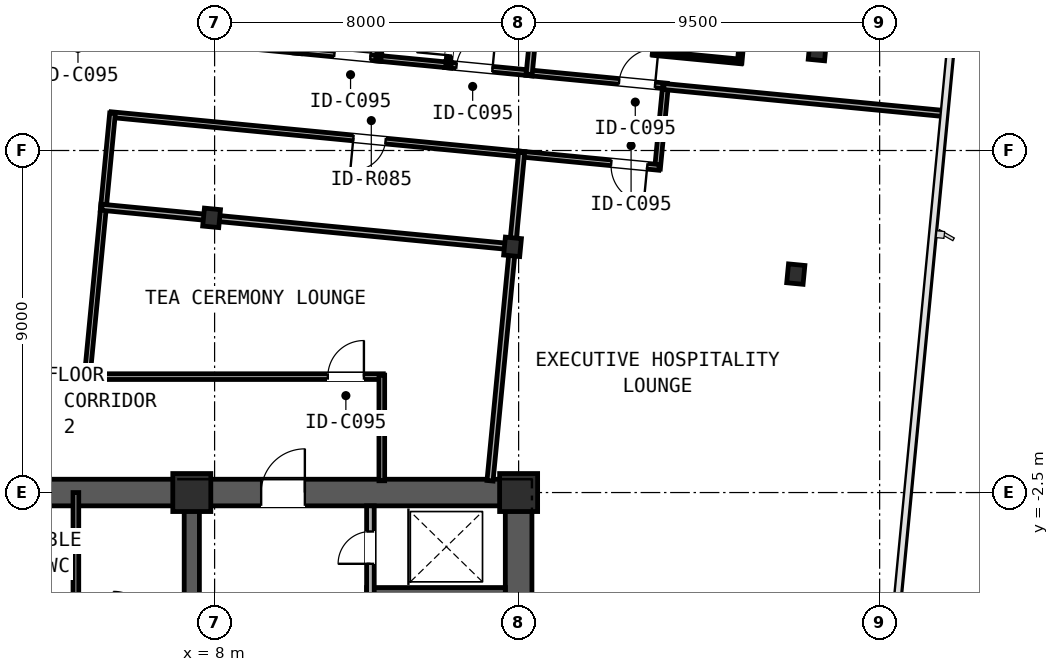
"""IFC4 building model, lengths in metres.
Left out: names, types, materials, properties, quantities, classifications, styles, units other than length and angle.
Written with IfcOpenShell. Run it as: python <this file> out.ifc"""

import sys

from ifc_helpers import new_model, si_unit, direction, frame, frame_2d, origin, origin_2d, place, context, subcontext, project, spatial, rectangle, i_section, extrude, element, fill, save


model = new_model("IFC4")
c1 = context("Model", 3, precision=1e-05, world=origin(), true_north=direction((0.0, 1.0)))
c2 = subcontext(c1, "Body", "Model", "MODEL_VIEW")
j1 = project(units=[si_unit("LENGTHUNIT", "METRE"), si_unit("PLANEANGLEUNIT", "RADIAN")], contexts=[c1])
p1 = place(None, origin())
s1 = spatial("IfcSite", under=j1, at=p1, CompositionType="ELEMENT")
p2 = place(p1, origin())
s2 = spatial("IfcBuilding", under=s1, at=p2, CompositionType="ELEMENT")
p3 = place(p2, frame((0.0, 0.0, 142.8)))
s3 = spatial("IfcBuildingStorey", under=s2, at=p3, CompositionType="ELEMENT", Elevation=142.8)
p4 = place(p3, frame((-16.35, -2.5, 0.0), z_axis=(0.0, 0.0, 1.0), x_axis=(1.0, 0.0, 0.0)))
e1 = element("IfcWall", 1, at=p4, inside=s3, PredefinedType="SHEAR", context=c2, shape_type="SweptSolid", body=[
    extrude(rectangle(XDim=32.7, YDim=0.7, at=frame_2d((16.35, 0.0))), origin(), (0.0, 0.0, 1.0), 2.91),
])
p5 = place(p4, frame((5.975, 0.0, 0.0)))
e2 = element("IfcOpeningElement", 2, at=p5, cuts=e1, PredefinedType="OPENING", context=c2, shape_type="SweptSolid", body=[
    extrude(rectangle(XDim=1.15, YDim=2.0, at=frame_2d((0.575, 1.0))), frame((0.0, 0.36, 0.0), z_axis=(0.0, -1.0, 0.0), x_axis=(1.0, 0.0, 0.0)), (0.0, 0.0, 1.0), 0.72),
])
p6 = place(p4, frame((15.55, 0.0, 0.0)))
e3 = element("IfcOpeningElement", 3, at=p6, cuts=e1, PredefinedType="OPENING", context=c2, shape_type="SweptSolid", body=[
    extrude(rectangle(XDim=1.6, YDim=2.0, at=frame_2d((0.8, 1.0))), frame((0.0, 0.36, 0.0), z_axis=(0.0, -1.0, 0.0), x_axis=(1.0, 0.0, 0.0)), (0.0, 0.0, 1.0), 0.72),
])
p7 = place(p4, frame((25.575, 0.0, 0.0)))
e4 = element("IfcOpeningElement", 4, at=p7, cuts=e1, PredefinedType="OPENING", context=c2, shape_type="SweptSolid", body=[
    extrude(rectangle(XDim=1.15, YDim=2.0, at=frame_2d((0.575, 1.0))), frame((0.0, 0.36, 0.0), z_axis=(0.0, -1.0, 0.0), x_axis=(1.0, 0.0, 0.0)), (0.0, 0.0, 1.0), 0.72),
])
p8 = place(p3, frame((16.0, -12.65, 0.0), z_axis=(0.0, 0.0, 1.0), x_axis=(0.0, 1.0, 0.0)))
e5 = element("IfcWall", 5, at=p8, inside=s3, PredefinedType="SHEAR", context=c2, shape_type="SweptSolid", body=[
    extrude(rectangle(XDim=9.8, YDim=0.7, at=frame_2d((4.9, 0.0))), origin(), (0.0, 0.0, 1.0), 2.91),
])
p9 = place(p3, frame((7.4, -12.65, 0.0), z_axis=(0.0, 0.0, 1.0), x_axis=(0.0, 1.0, 0.0)))
e6 = element("IfcWall", 6, at=p9, inside=s3, PredefinedType="SHEAR", context=c2, shape_type="SweptSolid", body=[
    extrude(rectangle(XDim=9.8, YDim=0.4, at=frame_2d((4.9, 0.0))), origin(), (0.0, 0.0, 1.0), 3.19),
])
p10 = place(p3, frame((12.0, -5.1, 0.0), z_axis=(0.0, 0.0, 1.0), x_axis=(1.0, 0.0, 0.0)))
e7 = element("IfcWall", 7, at=p10, inside=s3, PredefinedType="SOLIDWALL", context=c2, shape_type="SweptSolid", body=[
    extrude(rectangle(XDim=3.65, YDim=0.2, at=frame_2d((1.825, 0.0))), origin(), (0.0, 0.0, 1.0), 3.19),
])
for number, where, z_axis, x_axis in (
    (8, (7.4, -2.5, 0.0), (0.0, 0.0, 1.0), (1.0, 0.0, 0.0)),
    (9, (16.0, -2.5, 0.0), (0.0, 0.0, 1.0), (1.0, 0.0, 0.0)),
):
    element("IfcColumn", number, at=place(p3, frame(where, z_axis=z_axis, x_axis=x_axis)), inside=s3, PredefinedType="COLUMN", context=c2, shape_type="SweptSolid", body=[
        extrude(rectangle(XDim=1.0, YDim=1.0, at=origin_2d()), origin(), (0.0, 0.0, 1.0), 3.45),
    ])
for number, where, z_axis, x_axis in (
    (10, (7.921, 4.728, 0.0), (0.0, 0.0, 1.0), (0.995, -0.096, 0.0)),
    (11, (15.84, 3.965, 0.0), (0.0, 0.0, 1.0), (0.995, -0.096, 0.0)),
):
    element("IfcColumn", number, at=place(p3, frame(where, z_axis=z_axis, x_axis=x_axis)), inside=s3, PredefinedType="COLUMN", context=c2, shape_type="SweptSolid", body=[
        extrude(i_section(OverallWidth=0.424, OverallDepth=0.474, WebThickness=0.048, FlangeThickness=0.077, FilletRadius=0.031, at=origin_2d()), origin(), (0.0, 0.0, 1.0), 3.45),
    ])
for number, where, z_axis, x_axis in (
    (12, (23.293, 3.248, 0.0), (0.0, 0.0, 1.0), (0.995, -0.096, 0.0)),
    (13, (23.86, 9.128, 0.0), (0.0, 0.0, 1.0), (0.995, -0.096, 0.0)),
):
    element("IfcColumn", number, at=place(p3, frame(where, z_axis=z_axis, x_axis=x_axis)), inside=s3, PredefinedType="COLUMN", context=c2, shape_type="SweptSolid", body=[
        extrude(i_section(OverallWidth=0.432, OverallDepth=0.498, WebThickness=0.056, FlangeThickness=0.089, FilletRadius=0.031, at=origin_2d()), origin(), (0.0, 0.0, 1.0), 3.45),
    ])
p11 = place(p3, frame((12.1, -5.2, 0.0), z_axis=(0.0, 0.0, 1.0), x_axis=(0.0, 1.0, 0.0)))
e14 = element("IfcWall", 14, at=p11, inside=s3, PredefinedType="PARTITIONING", context=c2, shape_type="SweptSolid", body=[
    extrude(rectangle(XDim=2.35, YDim=0.2, at=frame_2d((1.175, 0.0))), origin(), (0.0, 0.0, 1.0), 2.225),
])
p12 = place(p11, frame((0.825, 0.0, 0.0)))
e15 = element("IfcOpeningElement", 15, at=p12, cuts=e14, PredefinedType="OPENING", context=c2, shape_type="SweptSolid", body=[
    extrude(rectangle(XDim=0.85, YDim=2.05, at=frame_2d((0.425, 1.025))), frame((0.0, 0.11, 0.0), z_axis=(0.0, -1.0, 0.0), x_axis=(1.0, 0.0, 0.0)), (0.0, 0.0, 1.0), 0.22),
])
p13 = place(p3, frame((4.35, -6.0, 0.0), z_axis=(0.0, 0.0, 1.0), x_axis=(0.0, 1.0, 0.0)))
e16 = element("IfcWall", 16, at=p13, inside=s3, PredefinedType="PARTITIONING", context=c2, shape_type="SweptSolid", body=[
    extrude(rectangle(XDim=3.5, YDim=0.15, at=frame_2d((1.75, 0.0))), origin(), (0.0, 0.0, 1.0), 2.225),
])
p14 = place(p3, frame((10.101, 9.139, 0.0), z_axis=(0.0, 0.0, 1.0), x_axis=(0.995393345625, -0.095875374756, 0.0)))
e17 = element("IfcWall", 17, at=p14, inside=s3, PredefinedType="PARTITIONING", context=c2, shape_type="SweptSolid", body=[
    extrude(rectangle(XDim=2.312, YDim=0.15, at=frame_2d((1.156, 0.0))), origin(), (0.0, 0.0, 1.0), 2.718),
])
p15 = place(p14, frame((1.056, 0.0, 0.0)))
e18 = element("IfcOpeningElement", 18, at=p15, cuts=e17, PredefinedType="OPENING", context=c2, shape_type="SweptSolid", body=[
    extrude(rectangle(XDim=0.95, YDim=2.15, at=frame_2d((0.475, 1.075))), frame((0.0, 0.085, 0.0), z_axis=(0.0, -1.0, 0.0), x_axis=(1.0, 0.0, 0.0)), (0.0, 0.0, 1.0), 0.17),
])
p16 = place(p3, frame((8.28, 9.314, 0.0), z_axis=(0.0, 0.0, 1.0), x_axis=(0.995393086543, -0.095878064554, 0.0)))
e19 = element("IfcWall", 19, at=p16, inside=s3, PredefinedType="PARTITIONING", context=c2, shape_type="SweptSolid", body=[
    extrude(rectangle(XDim=1.994, YDim=0.15, at=frame_2d((0.997, 0.0))), origin(), (0.0, 0.0, 1.0), 2.479),
])
p17 = place(p3, frame((14.061, 8.758, 0.0), z_axis=(0.0, 0.0, 1.0), x_axis=(0.995393345625, -0.095875374756, 0.0)))
e20 = element("IfcWall", 20, at=p17, inside=s3, PredefinedType="PARTITIONING", context=c2, shape_type="SweptSolid", body=[
    extrude(rectangle(XDim=2.312, YDim=0.15, at=frame_2d((1.156, 0.0))), origin(), (0.0, 0.0, 1.0), 2.479),
])
p18 = place(p17, frame((0.306, 0.0, 0.0)))
e21 = element("IfcOpeningElement", 21, at=p18, cuts=e20, PredefinedType="OPENING", context=c2, shape_type="SweptSolid", body=[
    extrude(rectangle(XDim=0.95, YDim=2.15, at=frame_2d((0.475, 1.075))), frame((0.0, 0.085, 0.0), z_axis=(0.0, -1.0, 0.0), x_axis=(1.0, 0.0, 0.0)), (0.0, 0.0, 1.0), 0.17),
])
p19 = place(p3, frame((12.24, 8.933, 0.0), z_axis=(0.0, 0.0, 1.0), x_axis=(0.995405888026, -0.095745068196, 0.0)))
e22 = element("IfcWall", 22, at=p19, inside=s3, PredefinedType="PARTITIONING", context=c2, shape_type="SweptSolid", body=[
    extrude(rectangle(XDim=1.994, YDim=0.15, at=frame_2d((0.997, 0.0))), origin(), (0.0, 0.0, 1.0), 2.718),
])
p20 = place(p3, frame((16.199, 8.552, 0.0), z_axis=(0.0, 0.0, 1.0), x_axis=(0.995391104887, -0.095898635608, 0.0)))
e23 = element("IfcWall", 23, at=p20, inside=s3, PredefinedType="PARTITIONING", context=c2, shape_type="SweptSolid", body=[
    extrude(rectangle(XDim=3.722, YDim=0.15, at=frame_2d((1.861, 0.0))), origin(), (0.0, 0.0, 1.0), 2.479),
])
p21 = place(p20, frame((2.457, 0.0, 0.0)))
e24 = element("IfcOpeningElement", 24, at=p21, cuts=e23, PredefinedType="OPENING", context=c2, shape_type="SweptSolid", body=[
    extrude(rectangle(XDim=0.95, YDim=2.15, at=frame_2d((0.475, 1.075))), frame((0.0, 0.085, 0.0), z_axis=(0.0, -1.0, 0.0), x_axis=(1.0, 0.0, 0.0)), (0.0, 0.0, 1.0), 0.17),
])
p22 = place(p3, frame((16.156, 6.396, 0.0), z_axis=(0.0, 0.0, 1.0), x_axis=(-0.99539478422, 0.095860437863, 0.0)))
e25 = element("IfcWall", 25, at=p22, inside=s3, PredefinedType="PARTITIONING", context=c2, shape_type="SweptSolid", body=[
    extrude(rectangle(XDim=10.936, YDim=0.15, at=frame_2d((5.468, 0.0))), origin(), (0.0, 0.0, 1.0), 2.479),
])
p23 = place(p22, frame((3.675, 0.0, 0.0)))
e26 = element("IfcOpeningElement", 26, at=p23, cuts=e25, PredefinedType="OPENING", context=c2, shape_type="SweptSolid", body=[
    extrude(rectangle(XDim=0.85, YDim=2.05, at=frame_2d((0.425, 1.025))), frame((0.0, 0.085, 0.0), z_axis=(0.0, -1.0, 0.0), x_axis=(1.0, 0.0, 0.0)), (0.0, 0.0, 1.0), 0.17),
])
p24 = place(p3, frame((5.314, 7.48, 0.0), z_axis=(0.0, 0.0, 1.0), x_axis=(-0.09587519517, -0.995393362923, 0.0)))
e27 = element("IfcWall", 27, at=p24, inside=s3, PredefinedType="PARTITIONING", context=c2, shape_type="SweptSolid", body=[
    extrude(rectangle(XDim=2.572, YDim=0.15, at=frame_2d((1.286, 0.0))), origin(), (0.0, 0.0, 1.0), 2.479),
])
p25 = place(p3, frame((5.084, 5.083, 0.0), z_axis=(0.0, 0.0, 1.0), x_axis=(-0.095867331855, -0.995394120277, 0.0)))
e28 = element("IfcWall", 28, at=p25, inside=s3, PredefinedType="PARTITIONING", context=c2, shape_type="SweptSolid", body=[
    extrude(rectangle(XDim=4.594, YDim=0.15, at=frame_2d((2.297, 0.0))), origin(), (0.0, 0.0, 1.0), 2.479),
])
p26 = place(p3, frame((4.607, 0.55, 0.0), z_axis=(0.0, 0.0, 1.0), x_axis=(1.0, 0.0, 0.0)))
e29 = element("IfcWall", 29, at=p26, inside=s3, PredefinedType="PARTITIONING", context=c2, shape_type="SweptSolid", body=[
    extrude(rectangle(XDim=7.833, YDim=0.15, at=frame_2d((3.917, 0.0))), origin(), (0.0, 0.0, 1.0), 2.479),
])
p27 = place(p26, frame((6.372, 0.0, 0.0)))
e30 = element("IfcOpeningElement", 30, at=p27, cuts=e29, PredefinedType="OPENING", context=c2, shape_type="SweptSolid", body=[
    extrude(rectangle(XDim=0.95, YDim=2.15, at=frame_2d((0.475, 1.075))), frame((0.0, 0.085, 0.0), z_axis=(0.0, -1.0, 0.0), x_axis=(1.0, 0.0, 0.0)), (0.0, 0.0, 1.0), 0.17),
])
p28 = place(p3, frame((12.4, 0.59, 0.0), z_axis=(0.0, 0.0, 1.0), x_axis=(0.0, -1.0, 0.0)))
e31 = element("IfcWall", 31, at=p28, inside=s3, PredefinedType="PARTITIONING", context=c2, shape_type="SweptSolid", body=[
    extrude(rectangle(XDim=2.78, YDim=0.15, at=frame_2d((1.39, 0.0))), origin(), (0.0, 0.0, 1.0), 2.225),
])
p29 = place(p3, frame((19.866, 8.219, 0.0), z_axis=(0.0, 0.0, 1.0), x_axis=(-0.095773447772, -0.995403157872, 0.0)))
e32 = element("IfcWall", 32, at=p29, inside=s3, PredefinedType="PARTITIONING", context=c2, shape_type="SweptSolid", body=[
    extrude(rectangle(XDim=2.21, YDim=0.15, at=frame_2d((1.105, 0.0))), origin(), (0.0, 0.0, 1.0), 2.718),
])
p30 = place(p3, frame((19.698, 6.055, 0.0), z_axis=(0.0, 0.0, 1.0), x_axis=(-0.995397364202, 0.095833644092, 0.0)))
e33 = element("IfcWall", 33, at=p30, inside=s3, PredefinedType="PARTITIONING", context=c2, shape_type="SweptSolid", body=[
    extrude(rectangle(XDim=3.722, YDim=0.15, at=frame_2d((1.861, 0.0))), origin(), (0.0, 0.0, 1.0), 2.479),
])
p31 = place(p30, frame((0.315, 0.0, 0.0)))
e34 = element("IfcOpeningElement", 34, at=p31, cuts=e33, PredefinedType="OPENING", context=c2, shape_type="SweptSolid", body=[
    extrude(rectangle(XDim=0.95, YDim=2.15, at=frame_2d((0.475, 1.075))), frame((0.0, 0.085, 0.0), z_axis=(0.0, -1.0, 0.0), x_axis=(1.0, 0.0, 0.0)), (0.0, 0.0, 1.0), 0.17),
])
p32 = place(p3, frame((10.179, 9.091, 0.0), z_axis=(0.0, 0.0, 1.0), x_axis=(0.095799078022, 0.995400691506, 0.0)))
e35 = element("IfcWall", 35, at=p32, inside=s3, PredefinedType="PARTITIONING", context=c2, shape_type="SweptSolid", body=[
    extrude(rectangle(XDim=2.63, YDim=0.12, at=frame_2d((1.315, 0.0))), origin(), (0.0, 0.0, 1.0), 2.479),
])
p33 = place(p32, frame((0.247, 0.0, 0.0)))
e36 = element("IfcOpeningElement", 36, at=p33, cuts=e35, PredefinedType="OPENING", context=c2, shape_type="SweptSolid", body=[
    extrude(rectangle(XDim=0.85, YDim=2.1, at=frame_2d((0.425, 1.05))), frame((0.0, 0.07, 0.0), z_axis=(0.0, -1.0, 0.0), x_axis=(1.0, 0.0, 0.0)), (0.0, 0.0, 1.0), 0.14),
])
p34 = place(p3, frame((12.526, 11.048, 0.0), z_axis=(0.0, 0.0, 1.0), x_axis=(-0.095875173929, -0.995393364969, 0.0)))
e37 = element("IfcWall", 37, at=p34, inside=s3, PredefinedType="PARTITIONING", context=c2, shape_type="SweptSolid", body=[
    extrude(rectangle(XDim=2.172, YDim=0.12, at=frame_2d((1.086, 0.0))), origin(), (0.0, 0.0, 1.0), 2.479),
])
p35 = place(p3, frame((14.139, 8.71, 0.0), z_axis=(0.0, 0.0, 1.0), x_axis=(0.095825980341, 0.995398102013, 0.0)))
e38 = element("IfcWall", 38, at=p35, inside=s3, PredefinedType="PARTITIONING", context=c2, shape_type="SweptSolid", body=[
    extrude(rectangle(XDim=2.13, YDim=0.12, at=frame_2d((1.065, 0.0))), origin(), (0.0, 0.0, 1.0), 2.479),
])
p36 = place(p35, frame((0.296, 0.0, 0.0)))
e39 = element("IfcOpeningElement", 39, at=p36, cuts=e38, PredefinedType="OPENING", context=c2, shape_type="SweptSolid", body=[
    extrude(rectangle(XDim=0.85, YDim=2.1, at=frame_2d((0.425, 1.05))), frame((0.0, 0.07, 0.0), z_axis=(0.0, -1.0, 0.0), x_axis=(1.0, 0.0, 0.0)), (0.0, 0.0, 1.0), 0.14),
])
p37 = place(p3, frame((16.389, 9.671, 0.0), z_axis=(0.0, 0.0, 1.0), x_axis=(-0.095811626391, -0.995399483749, 0.0)))
e40 = element("IfcWall", 40, at=p37, inside=s3, PredefinedType="PARTITIONING", context=c2, shape_type="SweptSolid", body=[
    extrude(rectangle(XDim=1.172, YDim=0.16, at=frame_2d((0.586, 0.0))), origin(), (0.0, 0.0, 1.0), 2.479),
])
p38 = place(p3, frame((19.798, 11.217, 0.0), z_axis=(0.0, 0.0, 1.0), x_axis=(-0.100620321887, -0.994924897077, 0.0)))
e41 = element("IfcWall", 41, at=p38, inside=s3, PredefinedType="PARTITIONING", context=c2, shape_type="SweptSolid", body=[
    extrude(rectangle(XDim=2.208, YDim=0.12, at=frame_2d((1.104, 0.0))), origin(), (0.0, 0.0, 1.0), 2.479),
])
p39 = place(p3, frame((19.54, 9.064, 0.0), z_axis=(0.0, 0.0, 1.0), x_axis=(0.995393658532, -0.095872126059, 0.0)))
e42 = element("IfcWall", 42, at=p39, inside=s3, PredefinedType="PARTITIONING", context=c2, shape_type="SweptSolid", body=[
    extrude(rectangle(XDim=2.33, YDim=0.12, at=frame_2d((1.165, 0.0))), origin(), (0.0, 0.0, 1.0), 2.718),
])
p40 = place(p3, frame((21.816, 8.805, 0.0), z_axis=(0.0, 0.0, 1.0), x_axis=(0.09110395288, 0.995841387857, 0.0)))
e43 = element("IfcWall", 43, at=p40, inside=s3, PredefinedType="PARTITIONING", context=c2, shape_type="SweptSolid", body=[
    extrude(rectangle(XDim=2.208, YDim=0.12, at=frame_2d((1.104, 0.0))), origin(), (0.0, 0.0, 1.0), 2.479),
])
p41 = place(p3, frame((27.236, 7.469, 0.0), z_axis=(0.0, 0.0, 1.0), x_axis=(-0.995396228159, 0.095845443117, 0.0)))
e44 = element("IfcWall", 44, at=p41, inside=s3, PredefinedType="PARTITIONING", context=c2, shape_type="SweptSolid", body=[
    extrude(rectangle(XDim=7.448, YDim=0.16, at=frame_2d((3.724, 0.0))), origin(), (0.0, 0.0, 1.0), 2.557),
])
p42 = place(p3, frame((7.745, 4.745, 0.0), z_axis=(0.0, 0.0, 1.0), x_axis=(-0.995392910691, 0.095879890208, 0.0)))
e45 = element("IfcWall", 45, at=p42, inside=s3, PredefinedType="PARTITIONING", context=c2, shape_type="SweptSolid", body=[
    extrude(rectangle(XDim=2.722, YDim=0.16, at=frame_2d((1.361, 0.0))), origin(), (0.0, 0.0, 1.0), 2.479),
])
p43 = place(p3, frame((15.665, 3.982, 0.0), z_axis=(0.0, 0.0, 1.0), x_axis=(-0.995396667246, 0.095840882902, 0.0)))
e46 = element("IfcWall", 46, at=p43, inside=s3, PredefinedType="PARTITIONING", context=c2, shape_type="SweptSolid", body=[
    extrude(rectangle(XDim=7.604, YDim=0.16, at=frame_2d((3.802, 0.0))), origin(), (0.0, 0.0, 1.0), 2.479),
])
p44 = place(p3, frame((16.079, 6.444, 0.0), z_axis=(0.0, 0.0, 1.0), x_axis=(-0.095794827695, -0.995401100555, 0.0)))
e47 = element("IfcWall", 47, at=p44, inside=s3, PredefinedType="PARTITIONING", context=c2, shape_type="SweptSolid", body=[
    extrude(rectangle(XDim=2.314, YDim=0.16, at=frame_2d((1.157, 0.0))), origin(), (0.0, 0.0, 1.0), 2.479),
])
p45 = place(p3, frame((15.823, 3.79, 0.0), z_axis=(0.0, 0.0, 1.0), x_axis=(-0.095865726078, -0.99539427493, 0.0)))
e48 = element("IfcWall", 48, at=p45, inside=s3, PredefinedType="PARTITIONING", context=c2, shape_type="SweptSolid", body=[
    extrude(rectangle(XDim=6.008, YDim=0.16, at=frame_2d((3.004, 0.0))), origin(), (0.0, 0.0, 1.0), 2.225),
])
p46 = place(p12, frame((0.85, 0.0, 0.0), z_axis=(0.0, 0.0, 1.0), x_axis=(-1.0, 0.0, 0.0)))
e49 = element("IfcDoor", 49, at=p46, inside=s3, OperationType="SINGLE_SWING_LEFT", PredefinedType="DOOR", context=c2, shape_type="SweptSolid", body=[
    extrude(rectangle(XDim=0.85, YDim=2.05, at=frame_2d((0.425, 1.025))), frame((0.0, 0.025, 0.0), z_axis=(0.0, -1.0, 0.0), x_axis=(1.0, 0.0, 0.0)), (0.0, 0.0, 1.0), 0.05),
])
fill(e15, e49)
p47 = place(p7, origin())
e50 = element("IfcDoor", 50, at=p47, inside=s3, OperationType="SINGLE_SWING_RIGHT", PredefinedType="DOOR", context=c2, shape_type="SweptSolid", body=[
    extrude(rectangle(XDim=1.15, YDim=2.0, at=frame_2d((0.575, 1.0))), frame((0.0, 0.025, 0.0), z_axis=(0.0, -1.0, 0.0), x_axis=(1.0, 0.0, 0.0)), (0.0, 0.0, 1.0), 0.05),
])
fill(e4, e50)
p48 = place(p15, frame((0.95, 0.0, 0.0), z_axis=(0.0, 0.0, 1.0), x_axis=(-1.0, 0.0, 0.0)))
e51 = element("IfcDoor", 51, at=p48, inside=s3, OperationType="SINGLE_SWING_RIGHT", PredefinedType="DOOR", context=c2, shape_type="SweptSolid", body=[
    extrude(rectangle(XDim=0.95, YDim=2.15, at=frame_2d((0.475, 1.075))), frame((0.0, 0.025, 0.0), z_axis=(0.0, -1.0, 0.0), x_axis=(1.0, 0.0, 0.0)), (0.0, 0.0, 1.0), 0.05),
])
fill(e18, e51)
p49 = place(p18, frame((0.95, 0.0, 0.0), z_axis=(0.0, 0.0, 1.0), x_axis=(-1.0, 0.0, 0.0)))
e52 = element("IfcDoor", 52, at=p49, inside=s3, OperationType="SINGLE_SWING_RIGHT", PredefinedType="DOOR", context=c2, shape_type="SweptSolid", body=[
    extrude(rectangle(XDim=0.95, YDim=2.15, at=frame_2d((0.475, 1.075))), frame((0.0, 0.025, 0.0), z_axis=(0.0, -1.0, 0.0), x_axis=(1.0, 0.0, 0.0)), (0.0, 0.0, 1.0), 0.05),
])
fill(e21, e52)
p50 = place(p36, origin())
e53 = element("IfcDoor", 53, at=p50, inside=s3, OperationType="SINGLE_SWING_LEFT", PredefinedType="DOOR", context=c2, shape_type="SweptSolid", body=[
    extrude(rectangle(XDim=0.85, YDim=2.1, at=frame_2d((0.425, 1.05))), frame((0.0, 0.025, 0.0), z_axis=(0.0, -1.0, 0.0), x_axis=(1.0, 0.0, 0.0)), (0.0, 0.0, 1.0), 0.05),
])
fill(e39, e53)
p51 = place(p21, frame((0.95, 0.0, 0.0), z_axis=(0.0, 0.0, 1.0), x_axis=(-1.0, 0.0, 0.0)))
e54 = element("IfcDoor", 54, at=p51, inside=s3, OperationType="SINGLE_SWING_RIGHT", PredefinedType="DOOR", context=c2, shape_type="SweptSolid", body=[
    extrude(rectangle(XDim=0.95, YDim=2.15, at=frame_2d((0.475, 1.075))), frame((0.0, 0.025, 0.0), z_axis=(0.0, -1.0, 0.0), x_axis=(1.0, 0.0, 0.0)), (0.0, 0.0, 1.0), 0.05),
])
fill(e24, e54)
p52 = place(p23, frame((0.85, 0.0, 0.0), z_axis=(0.0, 0.0, 1.0), x_axis=(-1.0, 0.0, 0.0)))
e55 = element("IfcDoor", 55, at=p52, inside=s3, OperationType="SINGLE_SWING_RIGHT", PredefinedType="DOOR", context=c2, shape_type="SweptSolid", body=[
    extrude(rectangle(XDim=0.85, YDim=2.05, at=frame_2d((0.425, 1.025))), frame((0.0, 0.025, 0.0), z_axis=(0.0, -1.0, 0.0), x_axis=(1.0, 0.0, 0.0)), (0.0, 0.0, 1.0), 0.05),
])
fill(e26, e55)
p53 = place(p27, origin())
e56 = element("IfcDoor", 56, at=p53, inside=s3, OperationType="SINGLE_SWING_RIGHT", PredefinedType="DOOR", context=c2, shape_type="SweptSolid", body=[
    extrude(rectangle(XDim=0.95, YDim=2.15, at=frame_2d((0.475, 1.075))), frame((0.0, 0.025, 0.0), z_axis=(0.0, -1.0, 0.0), x_axis=(1.0, 0.0, 0.0)), (0.0, 0.0, 1.0), 0.05),
])
fill(e30, e56)
p54 = place(p31, frame((0.95, 0.0, 0.0), z_axis=(0.0, 0.0, 1.0), x_axis=(-1.0, 0.0, 0.0)))
e57 = element("IfcDoor", 57, at=p54, inside=s3, OperationType="SINGLE_SWING_LEFT", PredefinedType="DOOR", context=c2, shape_type="SweptSolid", body=[
    extrude(rectangle(XDim=0.95, YDim=2.15, at=frame_2d((0.475, 1.075))), frame((0.0, 0.025, 0.0), z_axis=(0.0, -1.0, 0.0), x_axis=(1.0, 0.0, 0.0)), (0.0, 0.0, 1.0), 0.05),
])
fill(e34, e57)
save(model, sys.argv[1])
